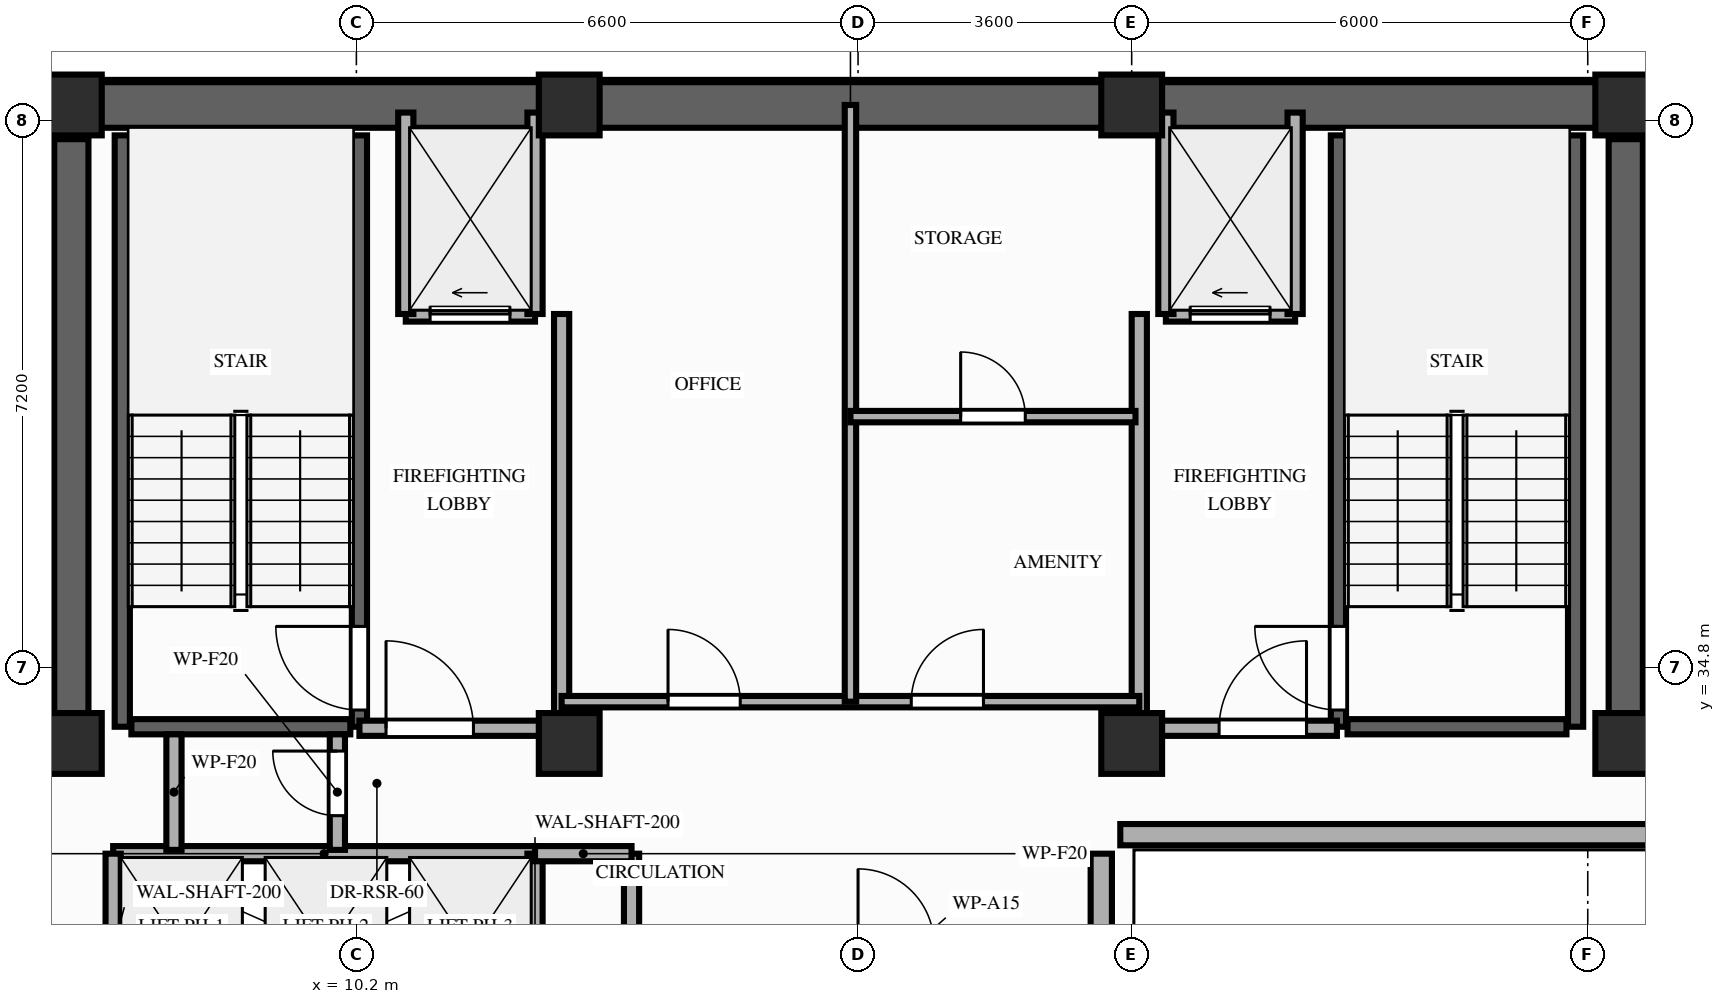
"""IFC4 building model, lengths in metres.
Left out: names, types, materials, properties, quantities, classifications, styles, units other than length and angle.
Written with IfcOpenShell. Run it as: python <this file> out.ifc"""

import sys

from ifc_helpers import new_model, si_unit, direction, frame, frame_2d, origin, origin_2d, place, context, subcontext, project, spatial, rectangle, extrude, element, fill, save


model = new_model("IFC4")
c1 = context("Model", 3, precision=1e-05, world=origin(), true_north=direction((0.0, 1.0)))
c2 = subcontext(c1, "Body", "Model", "MODEL_VIEW")
j1 = project(units=[si_unit("LENGTHUNIT", "METRE"), si_unit("PLANEANGLEUNIT", "RADIAN")], contexts=[c1])
p1 = place(None, origin())
s1 = spatial("IfcSite", under=j1, at=p1, CompositionType="ELEMENT")
p2 = place(p1, origin())
s2 = spatial("IfcBuilding", under=s1, at=p2, CompositionType="ELEMENT")
p3 = place(p2, frame((0.0, 0.0, 237.6)))
s3 = spatial("IfcBuildingStorey", under=s2, at=p3, CompositionType="ELEMENT", Elevation=237.6)
for number, where, z_axis, x_axis in (
    (1, (6.45, 33.8, 0.0), (0.0, 0.0, 1.0), (1.0, 0.0, 0.0)),
    (2, (13.0, 33.8, 0.0), (0.0, 0.0, 1.0), (1.0, 0.0, 0.0)),
    (3, (20.4, 33.8, 0.0), (0.0, 0.0, 1.0), (1.0, 0.0, 0.0)),
    (4, (26.9, 33.8, 0.0), (0.0, 0.0, 1.0), (1.0, 0.0, 0.0)),
    (5, (6.45, 42.2, 0.0), (0.0, 0.0, 1.0), (1.0, 0.0, 0.0)),
    (6, (13.0, 42.2, 0.0), (0.0, 0.0, 1.0), (1.0, 0.0, 0.0)),
    (7, (20.4, 42.2, 0.0), (0.0, 0.0, 1.0), (1.0, 0.0, 0.0)),
    (8, (26.9, 42.2, 0.0), (0.0, 0.0, 1.0), (1.0, 0.0, 0.0)),
):
    element("IfcColumn", number, at=place(p3, frame(where, z_axis=z_axis, x_axis=x_axis)), inside=s3, PredefinedType="COLUMN", context=c2, shape_type="SweptSolid", body=[
        extrude(rectangle(XDim=0.8, YDim=0.8, at=origin_2d()), origin(), (0.0, 0.0, 1.0), 3.2),
    ])
p4 = place(p3, frame((20.0, 10.8, 0.0), z_axis=(0.0, 0.0, 1.0), x_axis=(0.0, 1.0, 0.0)))
e9 = element("IfcWall", 9, at=p4, inside=s3, PredefinedType="STANDARD", context=c2, shape_type="SweptSolid", body=[
    extrude(rectangle(XDim=21.55, YDim=0.28, at=frame_2d((10.775, 0.0))), origin(), (0.0, 0.0, 1.0), 2.56),
])
p5 = place(p4, frame((3.08, 0.0, 0.85)))
e10 = element("IfcOpeningElement", 10, at=p5, cuts=e9, PredefinedType="OPENING", context=c2, shape_type="SweptSolid", body=[
    extrude(rectangle(XDim=2.6, YDim=1.46, at=frame_2d((1.3, 0.73))), frame((0.0, 0.15, 0.0), z_axis=(0.0, -1.0, 0.0), x_axis=(1.0, 0.0, 0.0)), (0.0, 0.0, 1.0), 0.3),
])
p6 = place(p4, frame((8.6, 0.0, 0.85)))
e11 = element("IfcOpeningElement", 11, at=p6, cuts=e9, PredefinedType="OPENING", context=c2, shape_type="SweptSolid", body=[
    extrude(rectangle(XDim=2.6, YDim=1.46, at=frame_2d((1.3, 0.73))), frame((0.0, 0.15, 0.0), z_axis=(0.0, -1.0, 0.0), x_axis=(1.0, 0.0, 0.0)), (0.0, 0.0, 1.0), 0.3),
])
p7 = place(p3, frame((20.25, 32.6, 0.0), z_axis=(0.0, 0.0, 1.0), x_axis=(1.0, 0.0, 0.0)))
e12 = element("IfcWall", 12, at=p7, inside=s3, PredefinedType="STANDARD", context=c2, shape_type="SweptSolid", body=[
    extrude(rectangle(XDim=7.35, YDim=0.28, at=frame_2d((3.675, 0.0))), origin(), (0.0, 0.0, 1.0), 2.56),
])
p8 = place(p3, frame((6.45, 42.2, 0.0), z_axis=(0.0, 0.0, 1.0), x_axis=(1.0, 0.0, 0.0)))
e13 = element("IfcWall", 13, at=p8, inside=s3, PredefinedType="SHEAR", context=c2, shape_type="SweptSolid", body=[
    extrude(rectangle(XDim=20.45, YDim=0.6, at=frame_2d((10.225, 0.0))), origin(), (0.0, 0.0, 1.0), 3.02),
])
for number, where, z_axis, x_axis in (
    (14, (6.45, 33.8, 0.0), (0.0, 0.0, 1.0), (0.0, 1.0, 0.0)),
    (15, (26.9, 33.8, 0.0), (0.0, 0.0, 1.0), (0.0, 1.0, 0.0)),
):
    element("IfcWall", number, at=place(p3, frame(where, z_axis=z_axis, x_axis=x_axis)), inside=s3, PredefinedType="SHEAR", context=c2, shape_type="SweptSolid", body=[
        extrude(rectangle(XDim=7.95, YDim=0.45, at=frame_2d((3.975, 0.0))), origin(), (0.0, 0.0, 1.0), 3.02),
    ])
p9 = place(p3, frame((7.12, 34.02, 0.0), z_axis=(0.0, 0.0, 1.0), x_axis=(0.0, 1.0, 0.0)))
e16 = element("IfcWall", 16, at=p9, inside=s3, PredefinedType="SHEAR", context=c2, shape_type="SweptSolid", body=[
    extrude(rectangle(XDim=7.78, YDim=0.2, at=frame_2d((3.89, 0.0))), origin(), (0.0, 0.0, 1.0), 3.02),
])
p10 = place(p3, frame((10.24, 34.02, 0.0), z_axis=(0.0, 0.0, 1.0), x_axis=(0.0, 1.0, 0.0)))
e17 = element("IfcWall", 17, at=p10, inside=s3, PredefinedType="SHEAR", context=c2, shape_type="SweptSolid", body=[
    extrude(rectangle(XDim=7.78, YDim=0.2, at=frame_2d((3.89, 0.0))), origin(), (0.0, 0.0, 1.0), 3.02),
])
p11 = place(p10, frame((0.22, 0.0, 0.0)))
e18 = element("IfcOpeningElement", 18, at=p11, cuts=e17, PredefinedType="OPENING", context=c2, shape_type="SweptSolid", body=[
    extrude(rectangle(XDim=1.1, YDim=2.15, at=frame_2d((0.55, 1.075))), frame((0.0, 0.11, 0.0), z_axis=(0.0, -1.0, 0.0), x_axis=(1.0, 0.0, 0.0)), (0.0, 0.0, 1.0), 0.22),
])
p12 = place(p3, frame((7.24, 34.02, 0.0), z_axis=(0.0, 0.0, 1.0), x_axis=(1.0, 0.0, 0.0)))
e19 = element("IfcWall", 19, at=p12, inside=s3, PredefinedType="SHEAR", context=c2, shape_type="SweptSolid", body=[
    extrude(rectangle(XDim=2.88, YDim=0.2, at=frame_2d((1.44, 0.0))), origin(), (0.0, 0.0, 1.0), 3.02),
])
p13 = place(p3, frame((23.12, 34.02, 0.0), z_axis=(0.0, 0.0, 1.0), x_axis=(0.0, 1.0, 0.0)))
e20 = element("IfcWall", 20, at=p13, inside=s3, PredefinedType="SHEAR", context=c2, shape_type="SweptSolid", body=[
    extrude(rectangle(XDim=7.78, YDim=0.2, at=frame_2d((3.89, 0.0))), origin(), (0.0, 0.0, 1.0), 3.02),
])
p14 = place(p13, frame((0.22, 0.0, 0.0)))
e21 = element("IfcOpeningElement", 21, at=p14, cuts=e20, PredefinedType="OPENING", context=c2, shape_type="SweptSolid", body=[
    extrude(rectangle(XDim=1.1, YDim=2.15, at=frame_2d((0.55, 1.075))), frame((0.0, 0.11, 0.0), z_axis=(0.0, -1.0, 0.0), x_axis=(1.0, 0.0, 0.0)), (0.0, 0.0, 1.0), 0.22),
])
p15 = place(p3, frame((26.24, 34.02, 0.0), z_axis=(0.0, 0.0, 1.0), x_axis=(0.0, 1.0, 0.0)))
e22 = element("IfcWall", 22, at=p15, inside=s3, PredefinedType="SHEAR", context=c2, shape_type="SweptSolid", body=[
    extrude(rectangle(XDim=7.78, YDim=0.2, at=frame_2d((3.89, 0.0))), origin(), (0.0, 0.0, 1.0), 3.02),
])
p16 = place(p3, frame((23.24, 34.02, 0.0), z_axis=(0.0, 0.0, 1.0), x_axis=(1.0, 0.0, 0.0)))
e23 = element("IfcWall", 23, at=p16, inside=s3, PredefinedType="SHEAR", context=c2, shape_type="SweptSolid", body=[
    extrude(rectangle(XDim=2.88, YDim=0.2, at=frame_2d((1.44, 0.0))), origin(), (0.0, 0.0, 1.0), 3.02),
])
p17 = place(p3, frame((7.0, 32.35, 0.0), z_axis=(0.0, 0.0, 1.0), x_axis=(1.0, 0.0, 0.0)))
e24 = element("IfcWall", 24, at=p17, inside=s3, PredefinedType="MOVABLE", context=c2, shape_type="SweptSolid", body=[
    extrude(rectangle(XDim=5.55, YDim=0.2, at=frame_2d((2.775, 0.0))), origin(), (0.0, 0.0, 1.0), 3.02),
])
for number, where, z_axis, x_axis in (
    (25, (7.0, 29.85, 0.0), (0.0, 0.0, 1.0), (0.0, 1.0, 0.0)),
    (26, (12.55, 29.85, 0.0), (0.0, 0.0, 1.0), (0.0, 1.0, 0.0)),
):
    element("IfcWall", number, at=place(p3, frame(where, z_axis=z_axis, x_axis=x_axis)), inside=s3, PredefinedType="MOVABLE", context=c2, shape_type="SweptSolid", body=[
        extrude(rectangle(XDim=2.5, YDim=0.2, at=frame_2d((1.25, 0.0))), origin(), (0.0, 0.0, 1.0), 3.02),
    ])
p18 = place(p3, frame((10.85, 39.45, 0.0), z_axis=(0.0, 0.0, 1.0), x_axis=(1.0, 0.0, 0.0)))
e27 = element("IfcWall", 27, at=p18, inside=s3, PredefinedType="MOVABLE", context=c2, shape_type="SweptSolid", body=[
    extrude(rectangle(XDim=1.7, YDim=0.2, at=frame_2d((0.85, 0.0))), origin(), (0.0, 0.0, 1.0), 3.02),
])
p19 = place(p18, frame((0.32, 0.0, 0.0)))
e28 = element("IfcOpeningElement", 28, at=p19, cuts=e27, PredefinedType="OPENING", context=c2, shape_type="SweptSolid", body=[
    extrude(rectangle(XDim=1.05, YDim=2.15, at=frame_2d((0.525, 1.075))), frame((0.0, 0.11, 0.0), z_axis=(0.0, -1.0, 0.0), x_axis=(1.0, 0.0, 0.0)), (0.0, 0.0, 1.0), 0.22),
])
p20 = place(p3, frame((20.85, 39.45, 0.0), z_axis=(0.0, 0.0, 1.0), x_axis=(1.0, 0.0, 0.0)))
e29 = element("IfcWall", 29, at=p20, inside=s3, PredefinedType="MOVABLE", context=c2, shape_type="SweptSolid", body=[
    extrude(rectangle(XDim=1.7, YDim=0.2, at=frame_2d((0.85, 0.0))), origin(), (0.0, 0.0, 1.0), 3.02),
])
p21 = place(p20, frame((0.32, 0.0, 0.0)))
e30 = element("IfcOpeningElement", 30, at=p21, cuts=e29, PredefinedType="OPENING", context=c2, shape_type="SweptSolid", body=[
    extrude(rectangle(XDim=1.05, YDim=2.15, at=frame_2d((0.525, 1.075))), frame((0.0, 0.11, 0.0), z_axis=(0.0, -1.0, 0.0), x_axis=(1.0, 0.0, 0.0)), (0.0, 0.0, 1.0), 0.22),
])
for number, where, z_axis, x_axis in (
    (31, (10.85, 39.45, 0.0), (0.0, 0.0, 1.0), (0.0, 1.0, 0.0)),
    (32, (12.55, 39.45, 0.0), (0.0, 0.0, 1.0), (0.0, 1.0, 0.0)),
):
    element("IfcWall", number, at=place(p3, frame(where, z_axis=z_axis, x_axis=x_axis)), inside=s3, PredefinedType="MOVABLE", context=c2, shape_type="SweptSolid", body=[
        extrude(rectangle(XDim=2.65, YDim=0.2, at=frame_2d((1.325, 0.0))), origin(), (0.0, 0.0, 1.0), 2.56),
    ])
p22 = place(p3, frame((12.9, 34.0, 0.0), z_axis=(0.0, 0.0, 1.0), x_axis=(0.0, 1.0, 0.0)))
e33 = element("IfcWall", 33, at=p22, inside=s3, PredefinedType="PARTITIONING", context=c2, shape_type="SweptSolid", body=[
    extrude(rectangle(XDim=5.45, YDim=0.2, at=frame_2d((2.725, 0.0))), origin(), (0.0, 0.0, 1.0), 2.56),
])
p23 = place(p3, frame((10.24, 34.0, 0.0), z_axis=(0.0, 0.0, 1.0), x_axis=(1.0, 0.0, 0.0)))
e34 = element("IfcWall", 34, at=p23, inside=s3, PredefinedType="PARTITIONING", context=c2, shape_type="SweptSolid", body=[
    extrude(rectangle(XDim=2.66, YDim=0.2, at=frame_2d((1.33, 0.0))), origin(), (0.0, 0.0, 1.0), 2.56),
])
p24 = place(p23, frame((0.35, 0.0, 0.0)))
e35 = element("IfcOpeningElement", 35, at=p24, cuts=e34, PredefinedType="OPENING", context=c2, shape_type="SweptSolid", body=[
    extrude(rectangle(XDim=1.15, YDim=2.15, at=frame_2d((0.575, 1.075))), frame((0.0, 0.11, 0.0), z_axis=(0.0, -1.0, 0.0), x_axis=(1.0, 0.0, 0.0)), (0.0, 0.0, 1.0), 0.22),
])
for number, where, z_axis, x_axis in (
    (36, (20.85, 39.45, 0.0), (0.0, 0.0, 1.0), (0.0, 1.0, 0.0)),
    (37, (22.55, 39.45, 0.0), (0.0, 0.0, 1.0), (0.0, 1.0, 0.0)),
):
    element("IfcWall", number, at=place(p3, frame(where, z_axis=z_axis, x_axis=x_axis)), inside=s3, PredefinedType="MOVABLE", context=c2, shape_type="SweptSolid", body=[
        extrude(rectangle(XDim=2.65, YDim=0.2, at=frame_2d((1.325, 0.0))), origin(), (0.0, 0.0, 1.0), 2.56),
    ])
p25 = place(p3, frame((20.5, 34.0, 0.0), z_axis=(0.0, 0.0, 1.0), x_axis=(0.0, 1.0, 0.0)))
e38 = element("IfcWall", 38, at=p25, inside=s3, PredefinedType="PARTITIONING", context=c2, shape_type="SweptSolid", body=[
    extrude(rectangle(XDim=5.45, YDim=0.2, at=frame_2d((2.725, 0.0))), origin(), (0.0, 0.0, 1.0), 2.56),
])
p26 = place(p3, frame((20.5, 34.0, 0.0), z_axis=(0.0, 0.0, 1.0), x_axis=(1.0, 0.0, 0.0)))
e39 = element("IfcWall", 39, at=p26, inside=s3, PredefinedType="PARTITIONING", context=c2, shape_type="SweptSolid", body=[
    extrude(rectangle(XDim=2.6, YDim=0.2, at=frame_2d((1.3, 0.0))), origin(), (0.0, 0.0, 1.0), 2.56),
])
p27 = place(p26, frame((1.05, 0.0, 0.0)))
e40 = element("IfcOpeningElement", 40, at=p27, cuts=e39, PredefinedType="OPENING", context=c2, shape_type="SweptSolid", body=[
    extrude(rectangle(XDim=1.15, YDim=2.15, at=frame_2d((0.575, 1.075))), frame((0.0, 0.11, 0.0), z_axis=(0.0, -1.0, 0.0), x_axis=(1.0, 0.0, 0.0)), (0.0, 0.0, 1.0), 0.22),
])
p28 = place(p3, frame((13.82, 29.85, 0.0), z_axis=(0.0, 0.0, 1.0), x_axis=(0.0, 1.0, 0.0)))
e41 = element("IfcWall", 41, at=p28, inside=s3, PredefinedType="PARTITIONING", context=c2, shape_type="SweptSolid", body=[
    extrude(rectangle(XDim=2.5, YDim=0.2, at=frame_2d((1.25, 0.0))), origin(), (0.0, 0.0, 1.0), 3.02),
])
p29 = place(p3, frame((12.55, 32.35, 0.0), z_axis=(0.0, 0.0, 1.0), x_axis=(1.0, 0.0, 0.0)))
e42 = element("IfcWall", 42, at=p29, inside=s3, PredefinedType="PARTITIONING", context=c2, shape_type="SweptSolid", body=[
    extrude(rectangle(XDim=1.27, YDim=0.2, at=frame_2d((0.635, 0.0))), origin(), (0.0, 0.0, 1.0), 3.02),
])
p30 = place(p3, frame((7.8, 32.4, 0.0), z_axis=(0.0, 0.0, 1.0), x_axis=(0.0, 1.0, 0.0)))
e43 = element("IfcWall", 43, at=p30, inside=s3, PredefinedType="PARTITIONING", context=c2, shape_type="SweptSolid", body=[
    extrude(rectangle(XDim=1.52, YDim=0.2, at=frame_2d((0.76, 0.0))), origin(), (0.0, 0.0, 1.0), 2.56),
])
p31 = place(p3, frame((9.95, 32.4, 0.0), z_axis=(0.0, 0.0, 1.0), x_axis=(0.0, 1.0, 0.0)))
e44 = element("IfcWall", 44, at=p31, inside=s3, PredefinedType="PARTITIONING", context=c2, shape_type="SweptSolid", body=[
    extrude(rectangle(XDim=1.52, YDim=0.2, at=frame_2d((0.76, 0.0))), origin(), (0.0, 0.0, 1.0), 2.56),
])
p32 = place(p31, frame((0.45, 0.0, 0.0)))
e45 = element("IfcOpeningElement", 45, at=p32, cuts=e44, PredefinedType="OPENING", context=c2, shape_type="SweptSolid", body=[
    extrude(rectangle(XDim=0.85, YDim=2.05, at=frame_2d((0.425, 1.025))), frame((0.0, 0.11, 0.0), z_axis=(0.0, -1.0, 0.0), x_axis=(1.0, 0.0, 0.0)), (0.0, 0.0, 1.0), 0.22),
])
p33 = place(p3, frame((12.9, 34.35, 0.0), z_axis=(0.0, 0.0, 1.0), x_axis=(1.0, 0.0, 0.0)))
e46 = element("IfcWall", 46, at=p33, inside=s3, PredefinedType="PARTITIONING", context=c2, shape_type="SweptSolid", body=[
    extrude(rectangle(XDim=7.6, YDim=0.15, at=frame_2d((3.8, 0.0))), origin(), (0.0, 0.0, 1.0), 3.02),
])
p34 = place(p33, frame((1.4, 0.0, 0.0)))
e47 = element("IfcOpeningElement", 47, at=p34, cuts=e46, PredefinedType="OPENING", context=c2, shape_type="SweptSolid", body=[
    extrude(rectangle(XDim=0.95, YDim=2.15, at=frame_2d((0.475, 1.075))), frame((0.0, 0.085, 0.0), z_axis=(0.0, -1.0, 0.0), x_axis=(1.0, 0.0, 0.0)), (0.0, 0.0, 1.0), 0.17),
])
p35 = place(p33, frame((4.6, 0.0, 0.0)))
e48 = element("IfcOpeningElement", 48, at=p35, cuts=e46, PredefinedType="OPENING", context=c2, shape_type="SweptSolid", body=[
    extrude(rectangle(XDim=0.95, YDim=2.15, at=frame_2d((0.475, 1.075))), frame((0.0, 0.085, 0.0), z_axis=(0.0, -1.0, 0.0), x_axis=(1.0, 0.0, 0.0)), (0.0, 0.0, 1.0), 0.17),
])
p36 = place(p3, frame((16.7, 34.35, 0.0), z_axis=(0.0, 0.0, 1.0), x_axis=(0.0, 1.0, 0.0)))
e49 = element("IfcWall", 49, at=p36, inside=s3, PredefinedType="PARTITIONING", context=c2, shape_type="SweptSolid", body=[
    extrude(rectangle(XDim=7.85, YDim=0.15, at=frame_2d((3.925, 0.0))), origin(), (0.0, 0.0, 1.0), 2.56),
])
p37 = place(p3, frame((16.7, 38.1, 0.0), z_axis=(0.0, 0.0, 1.0), x_axis=(1.0, 0.0, 0.0)))
e50 = element("IfcWall", 50, at=p37, inside=s3, PredefinedType="PARTITIONING", context=c2, shape_type="SweptSolid", body=[
    extrude(rectangle(XDim=3.75, YDim=0.15, at=frame_2d((1.875, 0.0))), origin(), (0.0, 0.0, 1.0), 3.02),
])
p38 = place(p37, frame((1.45, 0.0, 0.0)))
e51 = element("IfcOpeningElement", 51, at=p38, cuts=e50, PredefinedType="OPENING", context=c2, shape_type="SweptSolid", body=[
    extrude(rectangle(XDim=0.85, YDim=2.05, at=frame_2d((0.425, 1.025))), frame((0.0, 0.085, 0.0), z_axis=(0.0, -1.0, 0.0), x_axis=(1.0, 0.0, 0.0)), (0.0, 0.0, 1.0), 0.17),
])
p39 = place(p11, origin())
e52 = element("IfcDoor", 52, at=p39, inside=s3, OperationType="SINGLE_SWING_RIGHT", PredefinedType="DOOR", context=c2, shape_type="SweptSolid", body=[
    extrude(rectangle(XDim=1.1, YDim=2.15, at=frame_2d((0.55, 1.075))), frame((0.0, 0.025, 0.0), z_axis=(0.0, -1.0, 0.0), x_axis=(1.0, 0.0, 0.0)), (0.0, 0.0, 1.0), 0.05),
])
fill(e18, e52)
p40 = place(p14, origin())
e53 = element("IfcDoor", 53, at=p40, inside=s3, OperationType="SINGLE_SWING_RIGHT", PredefinedType="DOOR", context=c2, shape_type="SweptSolid", body=[
    extrude(rectangle(XDim=1.1, YDim=2.15, at=frame_2d((0.55, 1.075))), frame((0.0, 0.025, 0.0), z_axis=(0.0, -1.0, 0.0), x_axis=(1.0, 0.0, 0.0)), (0.0, 0.0, 1.0), 0.05),
])
fill(e21, e53)
p41 = place(p19, origin())
e54 = element("IfcDoor", 54, at=p41, inside=s3, OperationType="SLIDING_TO_LEFT", PredefinedType="DOOR", context=c2, shape_type="SweptSolid", body=[
    extrude(rectangle(XDim=1.05, YDim=2.15, at=frame_2d((0.525, 1.075))), frame((0.0, 0.025, 0.0), z_axis=(0.0, -1.0, 0.0), x_axis=(1.0, 0.0, 0.0)), (0.0, 0.0, 1.0), 0.05),
])
fill(e28, e54)
p42 = place(p21, origin())
e55 = element("IfcDoor", 55, at=p42, inside=s3, OperationType="SLIDING_TO_LEFT", PredefinedType="DOOR", context=c2, shape_type="SweptSolid", body=[
    extrude(rectangle(XDim=1.05, YDim=2.15, at=frame_2d((0.525, 1.075))), frame((0.0, 0.025, 0.0), z_axis=(0.0, -1.0, 0.0), x_axis=(1.0, 0.0, 0.0)), (0.0, 0.0, 1.0), 0.05),
])
fill(e30, e55)
p43 = place(p24, origin())
e56 = element("IfcDoor", 56, at=p43, inside=s3, OperationType="SINGLE_SWING_LEFT", PredefinedType="DOOR", context=c2, shape_type="SweptSolid", body=[
    extrude(rectangle(XDim=1.15, YDim=2.15, at=frame_2d((0.575, 1.075))), frame((0.0, 0.025, 0.0), z_axis=(0.0, -1.0, 0.0), x_axis=(1.0, 0.0, 0.0)), (0.0, 0.0, 1.0), 0.05),
])
fill(e35, e56)
p44 = place(p27, origin())
e57 = element("IfcDoor", 57, at=p44, inside=s3, OperationType="SINGLE_SWING_RIGHT", PredefinedType="DOOR", context=c2, shape_type="SweptSolid", body=[
    extrude(rectangle(XDim=1.15, YDim=2.15, at=frame_2d((0.575, 1.075))), frame((0.0, 0.025, 0.0), z_axis=(0.0, -1.0, 0.0), x_axis=(1.0, 0.0, 0.0)), (0.0, 0.0, 1.0), 0.05),
])
fill(e40, e57)
p45 = place(p32, origin())
e58 = element("IfcDoor", 58, at=p45, inside=s3, OperationType="SINGLE_SWING_RIGHT", PredefinedType="DOOR", context=c2, shape_type="SweptSolid", body=[
    extrude(rectangle(XDim=0.85, YDim=2.05, at=frame_2d((0.425, 1.025))), frame((0.0, 0.025, 0.0), z_axis=(0.0, -1.0, 0.0), x_axis=(1.0, 0.0, 0.0)), (0.0, 0.0, 1.0), 0.05),
])
fill(e45, e58)
p46 = place(p34, origin())
e59 = element("IfcDoor", 59, at=p46, inside=s3, OperationType="SINGLE_SWING_LEFT", PredefinedType="DOOR", context=c2, shape_type="SweptSolid", body=[
    extrude(rectangle(XDim=0.95, YDim=2.15, at=frame_2d((0.475, 1.075))), frame((0.0, 0.025, 0.0), z_axis=(0.0, -1.0, 0.0), x_axis=(1.0, 0.0, 0.0)), (0.0, 0.0, 1.0), 0.05),
])
fill(e47, e59)
p47 = place(p35, origin())
e60 = element("IfcDoor", 60, at=p47, inside=s3, OperationType="SINGLE_SWING_RIGHT", PredefinedType="DOOR", context=c2, shape_type="SweptSolid", body=[
    extrude(rectangle(XDim=0.95, YDim=2.15, at=frame_2d((0.475, 1.075))), frame((0.0, 0.025, 0.0), z_axis=(0.0, -1.0, 0.0), x_axis=(1.0, 0.0, 0.0)), (0.0, 0.0, 1.0), 0.05),
])
fill(e48, e60)
p48 = place(p38, origin())
e61 = element("IfcDoor", 61, at=p48, inside=s3, OperationType="SINGLE_SWING_LEFT", PredefinedType="DOOR", context=c2, shape_type="SweptSolid", body=[
    extrude(rectangle(XDim=0.85, YDim=2.05, at=frame_2d((0.425, 1.025))), frame((0.0, 0.025, 0.0), z_axis=(0.0, -1.0, 0.0), x_axis=(1.0, 0.0, 0.0)), (0.0, 0.0, 1.0), 0.05),
])
fill(e51, e61)
save(model, sys.argv[1])
